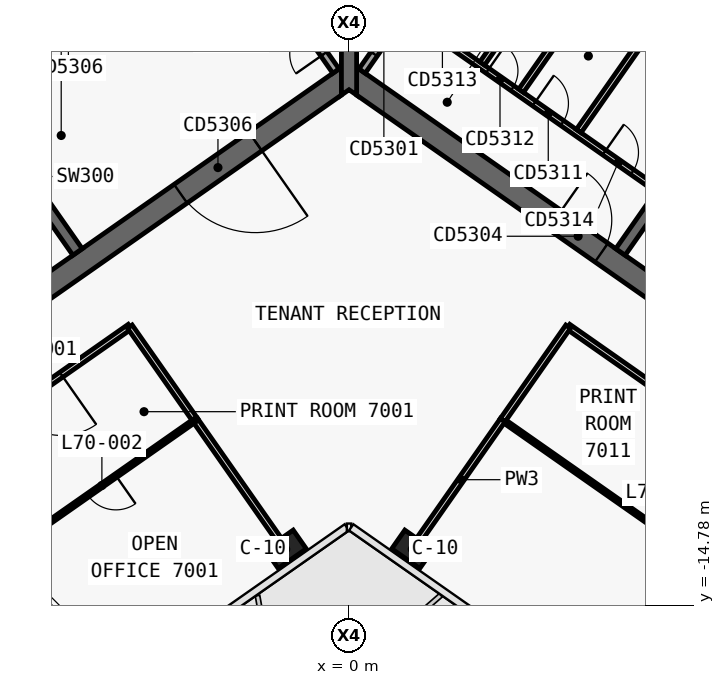
"""IFC4 building model, lengths in metres.
Left out: names, types, materials, properties, quantities, classifications, styles, units other than length and angle.
Written with IfcOpenShell. Run it as: python <this file> out.ifc"""

import sys

from ifc_helpers import new_model, si_unit, direction, frame, frame_2d, origin, origin_2d, place, context, subcontext, project, spatial, polyline, rectangle, outline, extrude, element, fill, save


model = new_model("IFC4")
c1 = context("Model", 3, precision=1e-05, world=origin(), true_north=direction((0.0, 1.0)))
c2 = subcontext(c1, "Body", "Model", "MODEL_VIEW")
j1 = project(units=[si_unit("LENGTHUNIT", "METRE"), si_unit("PLANEANGLEUNIT", "RADIAN")], contexts=[c1])
p1 = place(None, origin())
s1 = spatial("IfcSite", under=j1, at=p1, CompositionType="ELEMENT")
p2 = place(p1, origin())
s2 = spatial("IfcBuilding", under=s1, at=p2, CompositionType="ELEMENT")
p3 = place(p2, frame((0.0, 0.0, 295.6)))
s3 = spatial("IfcBuildingStorey", under=s2, at=p3, CompositionType="ELEMENT", Elevation=295.6)
p4 = place(p3, frame((-0.028, 12.066, 0.0), z_axis=(0.0, 0.0, 1.0), x_axis=(-0.819151382952, -0.573577380837, 0.0)))
e1 = element("IfcWall", 1, at=p4, inside=s3, PredefinedType="SHEAR", context=c2, shape_type="SweptSolid", body=[
    extrude(outline(polyline([(33.898, 0.3), (0.42, 0.3), (0.0, -0.3), (33.898, -0.3), (33.898, 0.3)])), origin(), (0.0, 0.0, 1.0), 3.9),
])
p5 = place(p3, frame((-0.028, -0.874, 0.0), z_axis=(0.0, 0.0, 1.0), x_axis=(-0.819150035022, -0.573579305871, 0.0)))
e2 = element("IfcWall", 2, at=p5, inside=s3, PredefinedType="SHEAR", context=c2, shape_type="SweptSolid", body=[
    extrude(outline(polyline([(26.476, 0.3), (0.42, 0.3), (0.0, -0.3), (26.476, -0.3), (26.476, 0.3)])), origin(), (0.0, 0.0, 1.0), 3.9),
])
p6 = place(p5, frame((2.976, 0.0, 0.0)))
e3 = element("IfcOpeningElement", 3, at=p6, cuts=e2, PredefinedType="OPENING", context=c2, shape_type="SweptSolid", body=[
    extrude(rectangle(XDim=2.4, YDim=2.1, at=frame_2d((1.2, 1.05))), frame((0.0, 0.31, 0.0), z_axis=(0.0, -1.0, 0.0), x_axis=(1.0, 0.0, 0.0)), (0.0, 0.0, 1.0), 0.62),
])
p7 = place(p5, frame((11.776, 0.0, 0.0)))
e4 = element("IfcOpeningElement", 4, at=p7, cuts=e2, PredefinedType="OPENING", context=c2, shape_type="SweptSolid", body=[
    extrude(rectangle(XDim=2.4, YDim=2.1, at=frame_2d((1.2, 1.05))), frame((0.0, 0.31, 0.0), z_axis=(0.0, -1.0, 0.0), x_axis=(1.0, 0.0, 0.0)), (0.0, 0.0, 1.0), 0.62),
])
p8 = place(p3, frame((-7.143, -5.49, 0.0), z_axis=(0.0, 0.0, 1.0), x_axis=(-0.573617744349, 0.819123118565, 0.0)))
e5 = element("IfcWall", 5, at=p8, inside=s3, PredefinedType="SHEAR", context=c2, shape_type="SweptSolid", body=[
    extrude(outline(polyline([(4.85, 0.15), (0.0, 0.15), (0.0, -0.15), (4.85, -0.15), (4.85, 0.15)])), origin(), (0.0, 0.0, 1.0), 3.9),
])
p9 = place(p3, frame((-2.638, 3.768, 0.0), z_axis=(0.0, 0.0, 1.0), x_axis=(-0.819155014212, -0.573572194837, 0.0)))
e6 = element("IfcWall", 6, at=p9, inside=s3, PredefinedType="SHEAR", context=c2, shape_type="SweptSolid", body=[
    extrude(outline(polyline([(26.4, 0.15), (0.0, 0.15), (0.0, -0.15), (26.4, -0.15), (26.4, 0.15)])), origin(), (0.0, 0.0, 1.0), 3.9),
])
p10 = place(p9, frame((1.169, 0.0, 0.0)))
e7 = element("IfcOpeningElement", 7, at=p10, cuts=e6, PredefinedType="OPENING", context=c2, shape_type="SweptSolid", body=[
    extrude(rectangle(XDim=1.1, YDim=2.1, at=frame_2d((0.55, 1.05))), frame((0.0, 0.16, 0.0), z_axis=(0.0, -1.0, 0.0), x_axis=(1.0, 0.0, 0.0)), (0.0, 0.0, 1.0), 0.32),
])
p11 = place(p9, frame((3.206, 0.0, 0.0)))
e8 = element("IfcOpeningElement", 8, at=p11, cuts=e6, PredefinedType="OPENING", context=c2, shape_type="SweptSolid", body=[
    extrude(rectangle(XDim=1.1, YDim=2.1, at=frame_2d((0.55, 1.05))), frame((0.0, 0.16, 0.0), z_axis=(0.0, -1.0, 0.0), x_axis=(1.0, 0.0, 0.0)), (0.0, 0.0, 1.0), 0.32),
])
p12 = place(p9, frame((5.244, 0.0, 0.0)))
e9 = element("IfcOpeningElement", 9, at=p12, cuts=e6, PredefinedType="OPENING", context=c2, shape_type="SweptSolid", body=[
    extrude(rectangle(XDim=1.1, YDim=2.1, at=frame_2d((0.55, 1.05))), frame((0.0, 0.16, 0.0), z_axis=(0.0, -1.0, 0.0), x_axis=(1.0, 0.0, 0.0)), (0.0, 0.0, 1.0), 0.32),
])
p13 = place(p9, frame((7.281, 0.0, 0.0)))
e10 = element("IfcOpeningElement", 10, at=p13, cuts=e6, PredefinedType="OPENING", context=c2, shape_type="SweptSolid", body=[
    extrude(rectangle(XDim=1.1, YDim=2.1, at=frame_2d((0.55, 1.05))), frame((0.0, 0.16, 0.0), z_axis=(0.0, -1.0, 0.0), x_axis=(1.0, 0.0, 0.0)), (0.0, 0.0, 1.0), 0.32),
])
p14 = place(p9, frame((9.688, 0.0, 0.0)))
e11 = element("IfcOpeningElement", 11, at=p14, cuts=e6, PredefinedType="OPENING", context=c2, shape_type="SweptSolid", body=[
    extrude(rectangle(XDim=1.1, YDim=2.1, at=frame_2d((0.55, 1.05))), frame((0.0, 0.16, 0.0), z_axis=(0.0, -1.0, 0.0), x_axis=(1.0, 0.0, 0.0)), (0.0, 0.0, 1.0), 0.32),
])
p15 = place(p9, frame((11.863, 0.0, 0.0)))
e12 = element("IfcOpeningElement", 12, at=p15, cuts=e6, PredefinedType="OPENING", context=c2, shape_type="SweptSolid", body=[
    extrude(rectangle(XDim=1.1, YDim=2.1, at=frame_2d((0.55, 1.05))), frame((0.0, 0.16, 0.0), z_axis=(0.0, -1.0, 0.0), x_axis=(1.0, 0.0, 0.0)), (0.0, 0.0, 1.0), 0.32),
])
p16 = place(p9, frame((14.552, 0.0, 0.0)))
e13 = element("IfcOpeningElement", 13, at=p16, cuts=e6, PredefinedType="OPENING", context=c2, shape_type="SweptSolid", body=[
    extrude(rectangle(XDim=1.0, YDim=2.1, at=frame_2d((0.5, 1.05))), frame((0.0, 0.16, 0.0), z_axis=(0.0, -1.0, 0.0), x_axis=(1.0, 0.0, 0.0)), (0.0, 0.0, 1.0), 0.32),
])
p17 = place(p9, frame((16.627, 0.0, 0.0)))
e14 = element("IfcOpeningElement", 14, at=p17, cuts=e6, PredefinedType="OPENING", context=c2, shape_type="SweptSolid", body=[
    extrude(rectangle(XDim=1.0, YDim=2.1, at=frame_2d((0.5, 1.05))), frame((0.0, 0.16, 0.0), z_axis=(0.0, -1.0, 0.0), x_axis=(1.0, 0.0, 0.0)), (0.0, 0.0, 1.0), 0.32),
])
p18 = place(p3, frame((0.028, 12.066, 0.0), z_axis=(0.0, 0.0, 1.0), x_axis=(0.819151382952, -0.573577380837, 0.0)))
e15 = element("IfcWall", 15, at=p18, inside=s3, PredefinedType="SHEAR", context=c2, shape_type="SweptSolid", body=[
    extrude(outline(polyline([(33.898, 0.3), (0.0, 0.3), (0.42, -0.3), (33.898, -0.3), (33.898, 0.3)])), origin(), (0.0, 0.0, 1.0), 3.9),
])
p19 = place(p3, frame((0.028, -0.874, 0.0), z_axis=(0.0, 0.0, 1.0), x_axis=(0.819150035022, -0.573579305871, 0.0)))
e16 = element("IfcWall", 16, at=p19, inside=s3, PredefinedType="SHEAR", context=c2, shape_type="SweptSolid", body=[
    extrude(outline(polyline([(26.476, 0.3), (0.0, 0.3), (0.42, -0.3), (26.476, -0.3), (26.476, 0.3)])), origin(), (0.0, 0.0, 1.0), 3.9),
])
p20 = place(p19, frame((6.576, 0.0, 0.0)))
e17 = element("IfcOpeningElement", 17, at=p20, cuts=e16, PredefinedType="OPENING", context=c2, shape_type="SweptSolid", body=[
    extrude(rectangle(XDim=1.5, YDim=2.1, at=frame_2d((0.75, 1.05))), frame((0.0, 0.31, 0.0), z_axis=(0.0, -1.0, 0.0), x_axis=(1.0, 0.0, 0.0)), (0.0, 0.0, 1.0), 0.62),
])
p21 = place(p19, frame((12.226, 0.0, 0.0)))
e18 = element("IfcOpeningElement", 18, at=p21, cuts=e16, PredefinedType="OPENING", context=c2, shape_type="SweptSolid", body=[
    extrude(rectangle(XDim=1.5, YDim=2.1, at=frame_2d((0.75, 1.05))), frame((0.0, 0.31, 0.0), z_axis=(0.0, -1.0, 0.0), x_axis=(1.0, 0.0, 0.0)), (0.0, 0.0, 1.0), 0.62),
])
p22 = place(p3, frame((7.143, -5.49, 0.0), z_axis=(0.0, 0.0, 1.0), x_axis=(0.573617744349, 0.819123118565, 0.0)))
e19 = element("IfcWall", 19, at=p22, inside=s3, PredefinedType="SHEAR", context=c2, shape_type="SweptSolid", body=[
    extrude(outline(polyline([(0.0, 0.15), (0.0, -0.15), (4.85, -0.15), (4.85, 0.15), (0.0, 0.15)])), origin(), (0.0, 0.0, 1.0), 3.9),
])
p23 = place(p3, frame((2.638, 3.768, 0.0), z_axis=(0.0, 0.0, 1.0), x_axis=(0.819155014212, -0.573572194837, 0.0)))
e20 = element("IfcWall", 20, at=p23, inside=s3, PredefinedType="SHEAR", context=c2, shape_type="SweptSolid", body=[
    extrude(outline(polyline([(0.0, 0.15), (0.0, -0.15), (26.4, -0.15), (26.4, 0.15), (0.0, 0.15)])), origin(), (0.0, 0.0, 1.0), 3.9),
])
p24 = place(p23, frame((9.637, 0.0, 0.0)))
e21 = element("IfcOpeningElement", 21, at=p24, cuts=e20, PredefinedType="OPENING", context=c2, shape_type="SweptSolid", body=[
    extrude(rectangle(XDim=1.2, YDim=2.1, at=frame_2d((0.6, 1.05))), frame((0.0, 0.16, 0.0), z_axis=(0.0, -1.0, 0.0), x_axis=(1.0, 0.0, 0.0)), (0.0, 0.0, 1.0), 0.32),
])
p25 = place(p23, frame((11.812, 0.0, 0.0)))
e22 = element("IfcOpeningElement", 22, at=p25, cuts=e20, PredefinedType="OPENING", context=c2, shape_type="SweptSolid", body=[
    extrude(rectangle(XDim=1.2, YDim=2.1, at=frame_2d((0.6, 1.05))), frame((0.0, 0.16, 0.0), z_axis=(0.0, -1.0, 0.0), x_axis=(1.0, 0.0, 0.0)), (0.0, 0.0, 1.0), 0.32),
])
p26 = place(p23, frame((13.988, 0.0, 0.0)))
e23 = element("IfcOpeningElement", 23, at=p26, cuts=e20, PredefinedType="OPENING", context=c2, shape_type="SweptSolid", body=[
    extrude(rectangle(XDim=1.2, YDim=2.1, at=frame_2d((0.6, 1.05))), frame((0.0, 0.16, 0.0), z_axis=(0.0, -1.0, 0.0), x_axis=(1.0, 0.0, 0.0)), (0.0, 0.0, 1.0), 0.32),
])
p27 = place(p23, frame((16.262, 0.0, 0.0)))
e24 = element("IfcOpeningElement", 24, at=p27, cuts=e20, PredefinedType="OPENING", context=c2, shape_type="SweptSolid", body=[
    extrude(rectangle(XDim=1.0, YDim=2.1, at=frame_2d((0.5, 1.05))), frame((0.0, 0.16, 0.0), z_axis=(0.0, -1.0, 0.0), x_axis=(1.0, 0.0, 0.0)), (0.0, 0.0, 1.0), 0.32),
])
p28 = place(p3, frame((0.0, -1.361, 0.0), z_axis=(0.0, 0.0, 1.0), x_axis=(0.0, 1.0, 0.0)))
e25 = element("IfcWall", 25, at=p28, inside=s3, PredefinedType="SHEAR", context=c2, shape_type="SweptSolid", body=[
    extrude(outline(polyline([(0.14, 0.2), (0.0, 0.2), (0.14, 0.0), (0.0, -0.2), (0.14, -0.2), (1.012, -0.2), (12.94, -0.2), (13.813, -0.2), (13.893, -0.2), (13.933, -0.172), (13.813, 0.0), (13.933, 0.172), (13.893, 0.2), (13.813, 0.2), (12.94, 0.2), (1.012, 0.2), (0.14, 0.2)])), origin(), (0.0, 0.0, 1.0), 3.9),
])
for number, where, z_axis, x_axis in (
    (26, (-1.665, -13.313, 0.0), (0.0, 0.0, 1.0), (-0.819, -0.574, 0.0)),
    (27, (1.665, -13.313, 0.0), (0.0, 0.0, 1.0), (0.819, -0.574, 0.0)),
):
    element("IfcColumn", number, at=place(p3, frame(where, z_axis=z_axis, x_axis=x_axis)), inside=s3, PredefinedType="COLUMN", context=c2, shape_type="SweptSolid", body=[
        extrude(rectangle(XDim=0.9, YDim=0.6, at=origin_2d()), origin(), (0.0, 0.0, 1.0), 3.9),
    ])
p29 = place(p3, frame((1.516, 0.77, 0.0), z_axis=(0.0, 0.0, 1.0), x_axis=(0.819146424436, -0.573584462249, 0.0)))
e28 = element("IfcWall", 28, at=p29, inside=s3, PredefinedType="PARTITIONING", context=c2, shape_type="SweptSolid", body=[
    extrude(rectangle(XDim=8.05, YDim=0.15, at=frame_2d((4.025, 0.0))), origin(), (0.0, 0.0, 1.0), 3.62),
])
p30 = place(p29, frame((0.7, 0.0, 0.0)))
e29 = element("IfcOpeningElement", 29, at=p30, cuts=e28, PredefinedType="OPENING", context=c2, shape_type="SweptSolid", body=[
    extrude(rectangle(XDim=0.9, YDim=2.1, at=frame_2d((0.45, 1.05))), frame((0.0, 0.085, 0.0), z_axis=(0.0, -1.0, 0.0), x_axis=(1.0, 0.0, 0.0)), (0.0, 0.0, 1.0), 0.17),
])
p31 = place(p29, frame((2.6, 0.0, 0.0)))
e30 = element("IfcOpeningElement", 30, at=p31, cuts=e28, PredefinedType="OPENING", context=c2, shape_type="SweptSolid", body=[
    extrude(rectangle(XDim=0.8, YDim=2.1, at=frame_2d((0.4, 1.05))), frame((0.0, 0.085, 0.0), z_axis=(0.0, -1.0, 0.0), x_axis=(1.0, 0.0, 0.0)), (0.0, 0.0, 1.0), 0.17),
])
p32 = place(p29, frame((4.1, 0.0, 0.0)))
e31 = element("IfcOpeningElement", 31, at=p32, cuts=e28, PredefinedType="OPENING", context=c2, shape_type="SweptSolid", body=[
    extrude(rectangle(XDim=0.9, YDim=2.1, at=frame_2d((0.45, 1.05))), frame((0.0, 0.085, 0.0), z_axis=(0.0, -1.0, 0.0), x_axis=(1.0, 0.0, 0.0)), (0.0, 0.0, 1.0), 0.17),
])
p33 = place(p29, frame((6.35, 0.0, 0.0)))
e32 = element("IfcOpeningElement", 32, at=p33, cuts=e28, PredefinedType="OPENING", context=c2, shape_type="SweptSolid", body=[
    extrude(rectangle(XDim=0.9, YDim=2.1, at=frame_2d((0.45, 1.05))), frame((0.0, 0.085, 0.0), z_axis=(0.0, -1.0, 0.0), x_axis=(1.0, 0.0, 0.0)), (0.0, 0.0, 1.0), 0.17),
])
p34 = place(p3, frame((3.504, -0.531, 0.0), z_axis=(0.0, 0.0, 1.0), x_axis=(0.573582013179, 0.819148139324, 0.0)))
e33 = element("IfcWall", 33, at=p34, inside=s3, PredefinedType="PARTITIONING", context=c2, shape_type="SweptSolid", body=[
    extrude(rectangle(XDim=2.875, YDim=0.15, at=frame_2d((1.438, 0.0))), origin(), (0.0, 0.0, 1.0), 3.62),
])
p35 = place(p3, frame((4.528, -1.248, 0.0), z_axis=(0.0, 0.0, 1.0), x_axis=(0.573621911162, 0.819120200602, 0.0)))
e34 = element("IfcWall", 34, at=p35, inside=s3, PredefinedType="PARTITIONING", context=c2, shape_type="SweptSolid", body=[
    extrude(rectangle(XDim=2.875, YDim=0.15, at=frame_2d((1.438, 0.0))), origin(), (0.0, 0.0, 1.0), 3.62),
])
p36 = place(p3, frame((6.044, -2.309, 0.0), z_axis=(0.0, 0.0, 1.0), x_axis=(0.573564930514, 0.819160100642, 0.0)))
e35 = element("IfcWall", 35, at=p36, inside=s3, PredefinedType="PARTITIONING", context=c2, shape_type="SweptSolid", body=[
    extrude(rectangle(XDim=2.875, YDim=0.15, at=frame_2d((1.438, 0.0))), origin(), (0.0, 0.0, 1.0), 3.62),
])
p37 = place(p3, frame((-0.344, -0.729, 0.0), z_axis=(0.0, 0.0, 1.0), x_axis=(-0.573560315113, 0.819163332265, 0.0)))
e36 = element("IfcWall", 36, at=p37, inside=s3, PredefinedType="SOLIDWALL", context=c2, shape_type="SweptSolid", body=[
    extrude(rectangle(XDim=4.85, YDim=0.2, at=frame_2d((2.425, 0.0))), origin(), (0.0, 0.0, 1.0), 3.62),
])
p38 = place(p37, frame((0.55, 0.0, 0.0)))
e37 = element("IfcOpeningElement", 37, at=p38, cuts=e36, PredefinedType="OPENING", context=c2, shape_type="SweptSolid", body=[
    extrude(rectangle(XDim=0.9, YDim=2.1, at=frame_2d((0.45, 1.05))), frame((0.0, 0.11, 0.0), z_axis=(0.0, -1.0, 0.0), x_axis=(1.0, 0.0, 0.0)), (0.0, 0.0, 1.0), 0.22),
])
p39 = place(p3, frame((0.344, -0.729, 0.0), z_axis=(0.0, 0.0, 1.0), x_axis=(0.573560315113, 0.819163332265, 0.0)))
e38 = element("IfcWall", 38, at=p39, inside=s3, PredefinedType="SOLIDWALL", context=c2, shape_type="SweptSolid", body=[
    extrude(rectangle(XDim=4.85, YDim=0.2, at=frame_2d((2.425, 0.0))), origin(), (0.0, 0.0, 1.0), 3.62),
])
p40 = place(p39, frame((0.55, 0.0, 0.0)))
e39 = element("IfcOpeningElement", 39, at=p40, cuts=e38, PredefinedType="OPENING", context=c2, shape_type="SweptSolid", body=[
    extrude(rectangle(XDim=0.9, YDim=2.1, at=frame_2d((0.45, 1.05))), frame((0.0, 0.11, 0.0), z_axis=(0.0, -1.0, 0.0), x_axis=(1.0, 0.0, 0.0)), (0.0, 0.0, 1.0), 0.22),
])
p41 = place(p3, frame((14.369, -13.479, 0.0), z_axis=(0.0, 0.0, 1.0), x_axis=(-0.819154371039, 0.573573113393, 0.0)))
e40 = element("IfcWall", 40, at=p41, inside=s3, PredefinedType="PARTITIONING", context=c2, shape_type="SweptSolid", body=[
    extrude(rectangle(XDim=10.502, YDim=0.15, at=frame_2d((5.251, 0.0))), origin(), (0.0, 0.0, 1.0), 3.05),
])
p42 = place(p41, frame((4.451, 0.0, 0.0)))
e41 = element("IfcOpeningElement", 41, at=p42, cuts=e40, PredefinedType="OPENING", context=c2, shape_type="SweptSolid", body=[
    extrude(rectangle(XDim=1.6, YDim=2.1, at=frame_2d((0.8, 1.05))), frame((0.0, 0.085, 0.0), z_axis=(0.0, -1.0, 0.0), x_axis=(1.0, 0.0, 0.0)), (0.0, 0.0, 1.0), 0.17),
])
p43 = place(p3, frame((-5.766, -7.456, 0.0), z_axis=(0.0, 0.0, 1.0), x_axis=(-0.819147828287, -0.573582457378, 0.0)))
e42 = element("IfcWall", 42, at=p43, inside=s3, PredefinedType="PARTITIONING", context=c2, shape_type="SweptSolid", body=[
    extrude(rectangle(XDim=6.002, YDim=0.15, at=frame_2d((3.001, 0.0))), origin(), (0.0, 0.0, 1.0), 3.05),
])
p44 = place(p43, frame((2.201, 0.0, 0.0)))
e43 = element("IfcOpeningElement", 43, at=p44, cuts=e42, PredefinedType="OPENING", context=c2, shape_type="SweptSolid", body=[
    extrude(rectangle(XDim=1.6, YDim=2.1, at=frame_2d((0.8, 1.05))), frame((0.0, 0.085, 0.0), z_axis=(0.0, -1.0, 0.0), x_axis=(1.0, 0.0, 0.0)), (0.0, 0.0, 1.0), 0.17),
])
p45 = place(p3, frame((12.646, -15.937, 0.0), z_axis=(0.0, 0.0, 1.0), x_axis=(-0.81914779845, 0.57358249999, 0.0)))
e44 = element("IfcWall", 44, at=p45, inside=s3, PredefinedType="PARTITIONING", context=c2, shape_type="SweptSolid", body=[
    extrude(rectangle(XDim=10.5, YDim=0.1, at=frame_2d((5.25, 0.0))), origin(), (0.0, 0.0, 1.0), 3.05),
])
p46 = place(p45, frame((4.8, 0.0, 0.0)))
e45 = element("IfcOpeningElement", 45, at=p46, cuts=e44, PredefinedType="OPENING", context=c2, shape_type="SweptSolid", body=[
    extrude(rectangle(XDim=0.9, YDim=2.1, at=frame_2d((0.45, 1.05))), frame((0.0, 0.06, 0.0), z_axis=(0.0, -1.0, 0.0), x_axis=(1.0, 0.0, 0.0)), (0.0, 0.0, 1.0), 0.12),
])
p47 = place(p3, frame((1.849, -13.051, 0.0), z_axis=(0.0, 0.0, 1.0), x_axis=(0.573594994199, 0.819139049631, 0.0)))
e46 = element("IfcWall", 46, at=p47, inside=s3, PredefinedType="PARTITIONING", context=c2, shape_type="SweptSolid", body=[
    extrude(rectangle(XDim=3.829, YDim=0.15, at=frame_2d((1.915, 0.0))), origin(), (0.0, 0.0, 1.0), 3.05),
])
p48 = place(p3, frame((4.046, -9.913, 0.0), z_axis=(0.0, 0.0, 1.0), x_axis=(0.573560650686, 0.819163097304, 0.0)))
e47 = element("IfcWall", 47, at=p48, inside=s3, PredefinedType="PARTITIONING", context=c2, shape_type="SweptSolid", body=[
    extrude(rectangle(XDim=3.0, YDim=0.15, at=frame_2d((1.5, 0.0))), origin(), (0.0, 0.0, 1.0), 3.05),
])
p49 = place(p3, frame((-1.849, -13.051, 0.0), z_axis=(0.0, 0.0, 1.0), x_axis=(-0.573586379587, 0.81914508187, 0.0)))
e48 = element("IfcWall", 48, at=p49, inside=s3, PredefinedType="PARTITIONING", context=c2, shape_type="SweptSolid", body=[
    extrude(rectangle(XDim=3.831, YDim=0.15, at=frame_2d((1.916, 0.0))), origin(), (0.0, 0.0, 1.0), 3.05),
])
p50 = place(p3, frame((-4.044, -9.915, 0.0), z_axis=(0.0, 0.0, 1.0), x_axis=(-0.573609604409, 0.819128818764, 0.0)))
e49 = element("IfcWall", 49, at=p50, inside=s3, PredefinedType="PARTITIONING", context=c2, shape_type="SweptSolid", body=[
    extrude(rectangle(XDim=3.004, YDim=0.15, at=frame_2d((1.502, 0.0))), origin(), (0.0, 0.0, 1.0), 3.05),
])
p51 = place(p3, frame((-4.045, -9.914, 0.0), z_axis=(0.0, 0.0, 1.0), x_axis=(-0.819149710902, -0.573579768758, 0.0)))
e50 = element("IfcWall", 50, at=p51, inside=s3, PredefinedType="PARTITIONING", context=c2, shape_type="SweptSolid", body=[
    extrude(rectangle(XDim=6.0, YDim=0.1, at=frame_2d((3.0, 0.0))), origin(), (0.0, 0.0, 1.0), 3.05),
])
p52 = place(p51, frame((2.55, 0.0, 0.0)))
e51 = element("IfcOpeningElement", 51, at=p52, cuts=e50, PredefinedType="OPENING", context=c2, shape_type="SweptSolid", body=[
    extrude(rectangle(XDim=0.9, YDim=2.1, at=frame_2d((0.45, 1.05))), frame((0.0, 0.06, 0.0), z_axis=(0.0, -1.0, 0.0), x_axis=(1.0, 0.0, 0.0)), (0.0, 0.0, 1.0), 0.12),
])
p53 = place(p3, frame((-6.379, -17.041, 0.0), z_axis=(0.0, 0.0, 1.0), x_axis=(-0.573564311442, 0.819160534108, 0.0)))
e52 = element("IfcWall", 52, at=p53, inside=s3, PredefinedType="PARTITIONING", context=c2, shape_type="SweptSolid", body=[
    extrude(rectangle(XDim=4.499, YDim=0.15, at=frame_2d((2.25, 0.0))), origin(), (0.0, 0.0, 1.0), 3.0),
])
p54 = place(p6, origin())
e53 = element("IfcDoor", 53, at=p54, inside=s3, OperationType="DOUBLE_DOOR_SINGLE_SWING", PredefinedType="DOOR", context=c2, shape_type="SweptSolid", body=[
    extrude(rectangle(XDim=2.4, YDim=2.1, at=frame_2d((1.2, 1.05))), frame((0.0, 0.025, 0.0), z_axis=(0.0, -1.0, 0.0), x_axis=(1.0, 0.0, 0.0)), (0.0, 0.0, 1.0), 0.05),
])
fill(e3, e53)
p55 = place(p31, origin())
e54 = element("IfcDoor", 54, at=p55, inside=s3, OperationType="SINGLE_SWING_RIGHT", PredefinedType="DOOR", context=c2, shape_type="SweptSolid", body=[
    extrude(rectangle(XDim=0.8, YDim=2.1, at=frame_2d((0.4, 1.05))), frame((0.0, 0.025, 0.0), z_axis=(0.0, -1.0, 0.0), x_axis=(1.0, 0.0, 0.0)), (0.0, 0.0, 1.0), 0.05),
])
fill(e30, e54)
p56 = place(p32, origin())
e55 = element("IfcDoor", 55, at=p56, inside=s3, OperationType="SINGLE_SWING_RIGHT", PredefinedType="DOOR", context=c2, shape_type="SweptSolid", body=[
    extrude(rectangle(XDim=0.9, YDim=2.1, at=frame_2d((0.45, 1.05))), frame((0.0, 0.025, 0.0), z_axis=(0.0, -1.0, 0.0), x_axis=(1.0, 0.0, 0.0)), (0.0, 0.0, 1.0), 0.05),
])
fill(e31, e55)
p57 = place(p33, origin())
e56 = element("IfcDoor", 56, at=p57, inside=s3, OperationType="SINGLE_SWING_RIGHT", PredefinedType="DOOR", context=c2, shape_type="SweptSolid", body=[
    extrude(rectangle(XDim=0.9, YDim=2.1, at=frame_2d((0.45, 1.05))), frame((0.0, 0.025, 0.0), z_axis=(0.0, -1.0, 0.0), x_axis=(1.0, 0.0, 0.0)), (0.0, 0.0, 1.0), 0.05),
])
fill(e32, e56)
p58 = place(p20, origin())
e57 = element("IfcDoor", 57, at=p58, inside=s3, OperationType="SINGLE_SWING_RIGHT", PredefinedType="DOOR", context=c2, shape_type="SweptSolid", body=[
    extrude(rectangle(XDim=1.5, YDim=2.1, at=frame_2d((0.75, 1.05))), frame((0.0, 0.025, 0.0), z_axis=(0.0, -1.0, 0.0), x_axis=(1.0, 0.0, 0.0)), (0.0, 0.0, 1.0), 0.05),
])
fill(e17, e57)
p59 = place(p38, origin())
e58 = element("IfcDoor", 58, at=p59, inside=s3, OperationType="SINGLE_SWING_RIGHT", PredefinedType="DOOR", context=c2, shape_type="SweptSolid", body=[
    extrude(rectangle(XDim=0.9, YDim=2.1, at=frame_2d((0.45, 1.05))), frame((0.0, 0.025, 0.0), z_axis=(0.0, -1.0, 0.0), x_axis=(1.0, 0.0, 0.0)), (0.0, 0.0, 1.0), 0.05),
])
fill(e37, e58)
p60 = place(p40, origin())
e59 = element("IfcDoor", 59, at=p60, inside=s3, OperationType="SINGLE_SWING_RIGHT", PredefinedType="DOOR", context=c2, shape_type="SweptSolid", body=[
    extrude(rectangle(XDim=0.9, YDim=2.1, at=frame_2d((0.45, 1.05))), frame((0.0, 0.025, 0.0), z_axis=(0.0, -1.0, 0.0), x_axis=(1.0, 0.0, 0.0)), (0.0, 0.0, 1.0), 0.05),
])
fill(e39, e59)
p61 = place(p44, origin())
e60 = element("IfcDoor", 60, at=p61, inside=s3, OperationType="DOUBLE_DOOR_SINGLE_SWING", PredefinedType="DOOR", context=c2, shape_type="SweptSolid", body=[
    extrude(rectangle(XDim=1.6, YDim=2.1, at=frame_2d((0.8, 1.05))), frame((0.0, 0.025, 0.0), z_axis=(0.0, -1.0, 0.0), x_axis=(1.0, 0.0, 0.0)), (0.0, 0.0, 1.0), 0.05),
])
fill(e43, e60)
p62 = place(p52, origin())
e61 = element("IfcDoor", 61, at=p62, inside=s3, OperationType="SINGLE_SWING_RIGHT", PredefinedType="DOOR", context=c2, shape_type="SweptSolid", body=[
    extrude(rectangle(XDim=0.9, YDim=2.1, at=frame_2d((0.45, 1.05))), frame((0.0, 0.025, 0.0), z_axis=(0.0, -1.0, 0.0), x_axis=(1.0, 0.0, 0.0)), (0.0, 0.0, 1.0), 0.05),
])
fill(e51, e61)
save(model, sys.argv[1])
